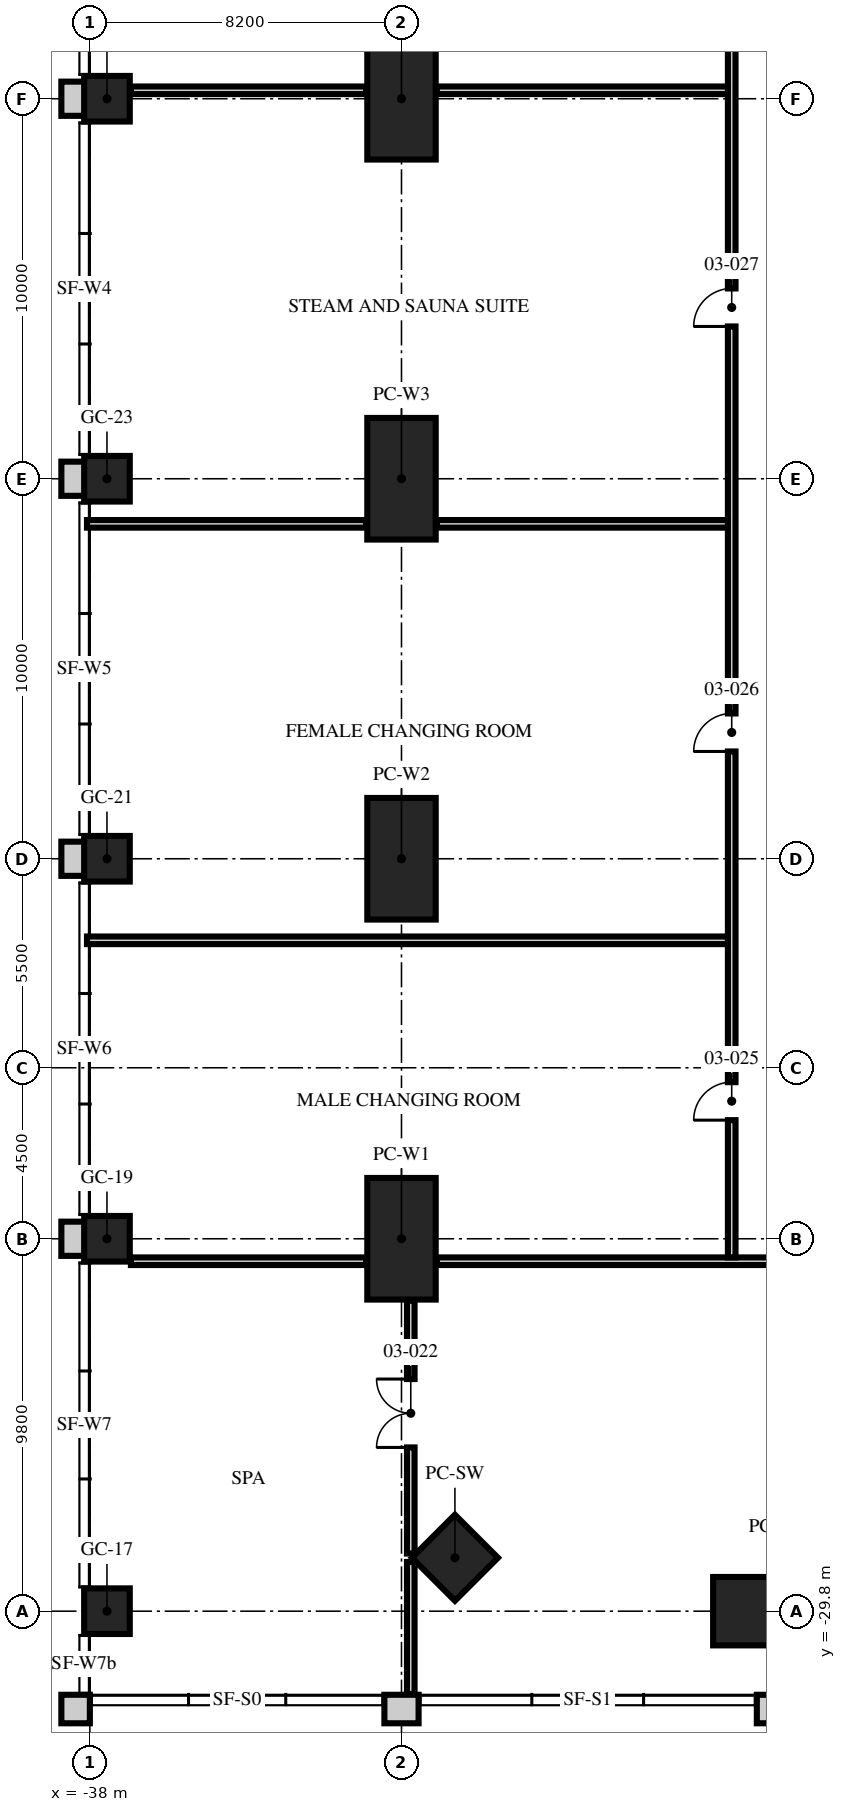
"""IFC4 building model, lengths in metres.
Left out: names, types, materials, properties, quantities, classifications, styles, units other than length and angle.
Written with IfcOpenShell. Run it as: python <this file> out.ifc"""

import sys

from ifc_helpers import new_model, si_unit, direction, frame, frame_2d, origin, origin_2d, place, context, subcontext, project, spatial, rectangle, hollow_rectangle, extrude, element, fill, save


model = new_model("IFC4")
c1 = context("Model", 3, precision=1e-05, world=origin(), true_north=direction((0.0, 1.0)))
c2 = subcontext(c1, "Body", "Model", "MODEL_VIEW")
j1 = project(units=[si_unit("LENGTHUNIT", "METRE"), si_unit("PLANEANGLEUNIT", "RADIAN")], contexts=[c1])
p1 = place(None, origin())
s1 = spatial("IfcSite", under=j1, at=p1, CompositionType="ELEMENT")
p2 = place(p1, origin())
s2 = spatial("IfcBuilding", under=s1, at=p2, CompositionType="ELEMENT")
p3 = place(p2, frame((0.0, 0.0, 16.0)))
s3 = spatial("IfcBuildingStorey", under=s2, at=p3, CompositionType="ELEMENT", Elevation=16.0)
for number, where, z_axis, x_axis in (
    (1, (-20.0, -29.8, 0.0), (0.0, 0.0, 1.0), (1.0, 0.0, 0.0)),
    (2, (-29.8, -20.0, 0.0), (0.0, 0.0, 1.0), (0.0, 1.0, 0.0)),
    (3, (-29.8, -10.0, 0.0), (0.0, 0.0, 1.0), (0.0, 1.0, 0.0)),
    (4, (-29.8, 0.0, 0.0), (0.0, 0.0, 1.0), (0.0, 1.0, 0.0)),
    (5, (-29.8, 10.0, 0.0), (0.0, 0.0, 1.0), (0.0, 1.0, 0.0)),
):
    element("IfcColumn", number, at=place(p3, frame(where, z_axis=z_axis, x_axis=x_axis)), inside=s3, PredefinedType="COLUMN", context=c2, shape_type="SweptSolid", body=[
        extrude(hollow_rectangle(XDim=3.2, YDim=1.8, WallThickness=0.2, at=origin_2d()), origin(), (0.0, 0.0, 1.0), 5.0),
    ])
p4 = place(p3, frame((-28.394, -28.394, 0.0), z_axis=(0.0, 0.0, 1.0), x_axis=(0.707106781187, -0.707106781187, 0.0)))
e6 = element("IfcColumn", 6, at=p4, inside=s3, PredefinedType="COLUMN", context=c2, shape_type="SweptSolid", body=[
    extrude(hollow_rectangle(XDim=1.6, YDim=1.6, WallThickness=0.1, at=origin_2d()), origin(), (0.0, 0.0, 1.0), 5.0),
])
for number, where, z_axis, x_axis in (
    (7, (-37.55, -29.8, 0.0), (0.0, 0.0, 1.0), (1.0, 0.0, 0.0)),
    (8, (-37.55, -20.0, 0.0), (0.0, 0.0, 1.0), (1.0, 0.0, 0.0)),
    (9, (-37.55, -10.0, 0.0), (0.0, 0.0, 1.0), (1.0, 0.0, 0.0)),
    (10, (-37.55, 0.0, 0.0), (0.0, 0.0, 1.0), (1.0, 0.0, 0.0)),
    (11, (-37.55, 10.0, 0.0), (0.0, 0.0, 1.0), (1.0, 0.0, 0.0)),
):
    element("IfcColumn", number, at=place(p3, frame(where, z_axis=z_axis, x_axis=x_axis)), inside=s3, PredefinedType="COLUMN", context=c2, shape_type="SweptSolid", body=[
        extrude(rectangle(XDim=1.2, YDim=1.2, at=origin_2d()), origin(), (0.0, 0.0, 1.0), 5.0),
    ])
for number, where, z_axis, x_axis in (
    (12, (-30.25, -32.375, 0.0), (0.0, 0.0, 1.0), (1.0, 0.0, 0.0)),
    (13, (-20.45, -32.375, 0.0), (0.0, 0.0, 1.0), (1.0, 0.0, 0.0)),
    (14, (-38.375, 10.45, 0.0), (0.0, 0.0, 1.0), (0.0, -1.0, 0.0)),
    (15, (-38.375, 0.45, 0.0), (0.0, 0.0, 1.0), (0.0, -1.0, 0.0)),
    (16, (-38.375, -9.55, 0.0), (0.0, 0.0, 1.0), (0.0, -1.0, 0.0)),
    (17, (-38.375, -19.55, 0.0), (0.0, 0.0, 1.0), (0.0, -1.0, 0.0)),
):
    element("IfcWall", number, at=place(p3, frame(where, z_axis=z_axis, x_axis=x_axis)), inside=s3, PredefinedType="SOLIDWALL", context=c2, shape_type="SweptSolid", body=[
        extrude(rectangle(XDim=0.9, YDim=0.75, at=frame_2d((0.45, 0.0))), origin(), (0.0, 0.0, 1.0), 5.0),
    ])
p5 = place(p3, frame((-38.375, -32.0, 0.0), z_axis=(0.0, 0.0, 1.0), x_axis=(0.0, -1.0, 0.0)))
e18 = element("IfcWall", 18, at=p5, inside=s3, PredefinedType="SOLIDWALL", context=c2, shape_type="SweptSolid", body=[
    extrude(rectangle(XDim=0.75, YDim=0.75, at=frame_2d((0.375, 0.0))), origin(), (0.0, 0.0, 1.0), 5.0),
])
p6 = place(p3, frame((-29.556, -31.98, 0.0), z_axis=(0.0, 0.0, 1.0), x_axis=(0.0, 1.0, 0.0)))
e19 = element("IfcWall", 19, at=p6, inside=s3, PredefinedType="SOLIDWALL", context=c2, shape_type="SweptSolid", body=[
    extrude(rectangle(XDim=3.475, YDim=0.2, at=frame_2d((1.737, 0.0))), origin(), (0.0, 0.0, 1.0), 4.75),
])
p7 = place(p3, frame((-29.556, -28.283, 0.0), z_axis=(0.0, 0.0, 1.0), x_axis=(0.0, 1.0, 0.0)))
e20 = element("IfcWall", 20, at=p7, inside=s3, PredefinedType="SOLIDWALL", context=c2, shape_type="SweptSolid", body=[
    extrude(rectangle(XDim=6.653, YDim=0.2, at=frame_2d((3.326, 0.0))), origin(), (0.0, 0.0, 1.0), 3.96),
])
p8 = place(p7, frame((2.792, 0.0, 0.0)))
e21 = element("IfcOpeningElement", 21, at=p8, cuts=e20, PredefinedType="OPENING", context=c2, shape_type="SweptSolid", body=[
    extrude(rectangle(XDim=1.8, YDim=2.4, at=frame_2d((0.9, 1.2))), frame((0.0, 0.11, 0.0), z_axis=(0.0, -1.0, 0.0), x_axis=(1.0, 0.0, 0.0)), (0.0, 0.0, 1.0), 0.22),
])
p9 = place(p3, frame((-36.92, -20.591, 0.0), z_axis=(0.0, 0.0, 1.0), x_axis=(1.0, 0.0, 0.0)))
e22 = element("IfcWall", 22, at=p9, inside=s3, PredefinedType="SOLIDWALL", context=c2, shape_type="SweptSolid", body=[
    extrude(rectangle(XDim=6.19, YDim=0.2, at=frame_2d((3.095, 0.0))), origin(), (0.0, 0.0, 1.0), 4.75),
])
p10 = place(p3, frame((-28.87, -20.591, 0.0), z_axis=(0.0, 0.0, 1.0), x_axis=(1.0, 0.0, 0.0)))
e23 = element("IfcWall", 23, at=p10, inside=s3, PredefinedType="SOLIDWALL", context=c2, shape_type="SweptSolid", body=[
    extrude(rectangle(XDim=57.74, YDim=0.2, at=frame_2d((28.87, 0.0))), origin(), (0.0, 0.0, 1.0), 3.55),
])
p11 = place(p10, frame((23.748, 0.0, 0.0)))
e24 = element("IfcOpeningElement", 24, at=p11, cuts=e23, PredefinedType="OPENING", context=c2, shape_type="SweptSolid", body=[
    extrude(rectangle(XDim=1.8, YDim=2.4, at=frame_2d((0.9, 1.2))), frame((0.0, 0.11, 0.0), z_axis=(0.0, -1.0, 0.0), x_axis=(1.0, 0.0, 0.0)), (0.0, 0.0, 1.0), 0.22),
])
p12 = place(p10, frame((44.859, 0.0, 0.0)))
e25 = element("IfcOpeningElement", 25, at=p12, cuts=e23, PredefinedType="OPENING", context=c2, shape_type="SweptSolid", body=[
    extrude(rectangle(XDim=1.8, YDim=2.4, at=frame_2d((0.9, 1.2))), frame((0.0, 0.11, 0.0), z_axis=(0.0, -1.0, 0.0), x_axis=(1.0, 0.0, 0.0)), (0.0, 0.0, 1.0), 0.22),
])
p13 = place(p3, frame((-21.111, -20.491, 0.0), z_axis=(0.0, 0.0, 1.0), x_axis=(0.0, 1.0, 0.0)))
e26 = element("IfcWall", 26, at=p13, inside=s3, PredefinedType="SOLIDWALL", context=c2, shape_type="SweptSolid", body=[
    extrude(rectangle(XDim=42.022, YDim=0.2, at=frame_2d((21.011, 0.0))), origin(), (0.0, 0.0, 1.0), 3.55),
])
p14 = place(p13, frame((3.613, 0.0, 0.0)))
e27 = element("IfcOpeningElement", 27, at=p14, cuts=e26, PredefinedType="OPENING", context=c2, shape_type="SweptSolid", body=[
    extrude(rectangle(XDim=1.0, YDim=2.1, at=frame_2d((0.5, 1.05))), frame((0.0, 0.11, 0.0), z_axis=(0.0, -1.0, 0.0), x_axis=(1.0, 0.0, 0.0)), (0.0, 0.0, 1.0), 0.22),
])
p15 = place(p13, frame((13.314, 0.0, 0.0)))
e28 = element("IfcOpeningElement", 28, at=p15, cuts=e26, PredefinedType="OPENING", context=c2, shape_type="SweptSolid", body=[
    extrude(rectangle(XDim=1.0, YDim=2.1, at=frame_2d((0.5, 1.05))), frame((0.0, 0.11, 0.0), z_axis=(0.0, -1.0, 0.0), x_axis=(1.0, 0.0, 0.0)), (0.0, 0.0, 1.0), 0.22),
])
p16 = place(p13, frame((24.499, 0.0, 0.0)))
e29 = element("IfcOpeningElement", 29, at=p16, cuts=e26, PredefinedType="OPENING", context=c2, shape_type="SweptSolid", body=[
    extrude(rectangle(XDim=1.0, YDim=2.1, at=frame_2d((0.5, 1.05))), frame((0.0, 0.11, 0.0), z_axis=(0.0, -1.0, 0.0), x_axis=(1.0, 0.0, 0.0)), (0.0, 0.0, 1.0), 0.22),
])
p17 = place(p13, frame((35.907, 0.0, 0.0)))
e30 = element("IfcOpeningElement", 30, at=p17, cuts=e26, PredefinedType="OPENING", context=c2, shape_type="SweptSolid", body=[
    extrude(rectangle(XDim=1.0, YDim=2.1, at=frame_2d((0.5, 1.05))), frame((0.0, 0.11, 0.0), z_axis=(0.0, -1.0, 0.0), x_axis=(1.0, 0.0, 0.0)), (0.0, 0.0, 1.0), 0.22),
])
p18 = place(p3, frame((-38.075, -12.146, 0.0), z_axis=(0.0, 0.0, 1.0), x_axis=(1.0, 0.0, 0.0)))
e31 = element("IfcWall", 31, at=p18, inside=s3, PredefinedType="SOLIDWALL", context=c2, shape_type="SweptSolid", body=[
    extrude(rectangle(XDim=16.864, YDim=0.2, at=frame_2d((8.432, 0.0))), origin(), (0.0, 0.0, 1.0), 3.65),
])
p19 = place(p3, frame((-38.075, -1.187, 0.0), z_axis=(0.0, 0.0, 1.0), x_axis=(1.0, 0.0, 0.0)))
e32 = element("IfcWall", 32, at=p19, inside=s3, PredefinedType="SOLIDWALL", context=c2, shape_type="SweptSolid", body=[
    extrude(rectangle(XDim=7.345, YDim=0.2, at=frame_2d((3.672, 0.0))), origin(), (0.0, 0.0, 1.0), 3.65),
])
p20 = place(p3, frame((-28.87, -1.187, 0.0), z_axis=(0.0, 0.0, 1.0), x_axis=(1.0, 0.0, 0.0)))
e33 = element("IfcWall", 33, at=p20, inside=s3, PredefinedType="SOLIDWALL", context=c2, shape_type="SweptSolid", body=[
    extrude(rectangle(XDim=7.659, YDim=0.2, at=frame_2d((3.83, 0.0))), origin(), (0.0, 0.0, 1.0), 4.75),
])
p21 = place(p3, frame((-36.92, 10.222, 0.0), z_axis=(0.0, 0.0, 1.0), x_axis=(1.0, 0.0, 0.0)))
e34 = element("IfcWall", 34, at=p21, inside=s3, PredefinedType="SOLIDWALL", context=c2, shape_type="SweptSolid", body=[
    extrude(rectangle(XDim=6.19, YDim=0.2, at=frame_2d((3.095, 0.0))), origin(), (0.0, 0.0, 1.0), 3.65),
])
p22 = place(p3, frame((-28.87, 10.222, 0.0), z_axis=(0.0, 0.0, 1.0), x_axis=(1.0, 0.0, 0.0)))
e35 = element("IfcWall", 35, at=p22, inside=s3, PredefinedType="SOLIDWALL", context=c2, shape_type="SweptSolid", body=[
    extrude(rectangle(XDim=7.659, YDim=0.2, at=frame_2d((3.83, 0.0))), origin(), (0.0, 0.0, 1.0), 3.742),
])
p23 = place(p8, origin())
e36 = element("IfcDoor", 36, at=p23, inside=s3, OperationType="DOUBLE_DOOR_SINGLE_SWING", PredefinedType="DOOR", context=c2, shape_type="SweptSolid", body=[
    extrude(rectangle(XDim=1.8, YDim=2.4, at=frame_2d((0.9, 1.2))), frame((0.0, 0.025, 0.0), z_axis=(0.0, -1.0, 0.0), x_axis=(1.0, 0.0, 0.0)), (0.0, 0.0, 1.0), 0.05),
])
fill(e21, e36)
p24 = place(p14, origin())
e37 = element("IfcDoor", 37, at=p24, inside=s3, OperationType="SINGLE_SWING_LEFT", PredefinedType="DOOR", context=c2, shape_type="SweptSolid", body=[
    extrude(rectangle(XDim=1.0, YDim=2.1, at=frame_2d((0.5, 1.05))), frame((0.0, 0.025, 0.0), z_axis=(0.0, -1.0, 0.0), x_axis=(1.0, 0.0, 0.0)), (0.0, 0.0, 1.0), 0.05),
])
fill(e27, e37)
p25 = place(p15, origin())
e38 = element("IfcDoor", 38, at=p25, inside=s3, OperationType="SINGLE_SWING_LEFT", PredefinedType="DOOR", context=c2, shape_type="SweptSolid", body=[
    extrude(rectangle(XDim=1.0, YDim=2.1, at=frame_2d((0.5, 1.05))), frame((0.0, 0.025, 0.0), z_axis=(0.0, -1.0, 0.0), x_axis=(1.0, 0.0, 0.0)), (0.0, 0.0, 1.0), 0.05),
])
fill(e28, e38)
p26 = place(p16, origin())
e39 = element("IfcDoor", 39, at=p26, inside=s3, OperationType="SINGLE_SWING_LEFT", PredefinedType="DOOR", context=c2, shape_type="SweptSolid", body=[
    extrude(rectangle(XDim=1.0, YDim=2.1, at=frame_2d((0.5, 1.05))), frame((0.0, 0.025, 0.0), z_axis=(0.0, -1.0, 0.0), x_axis=(1.0, 0.0, 0.0)), (0.0, 0.0, 1.0), 0.05),
])
fill(e29, e39)
save(model, sys.argv[1])
